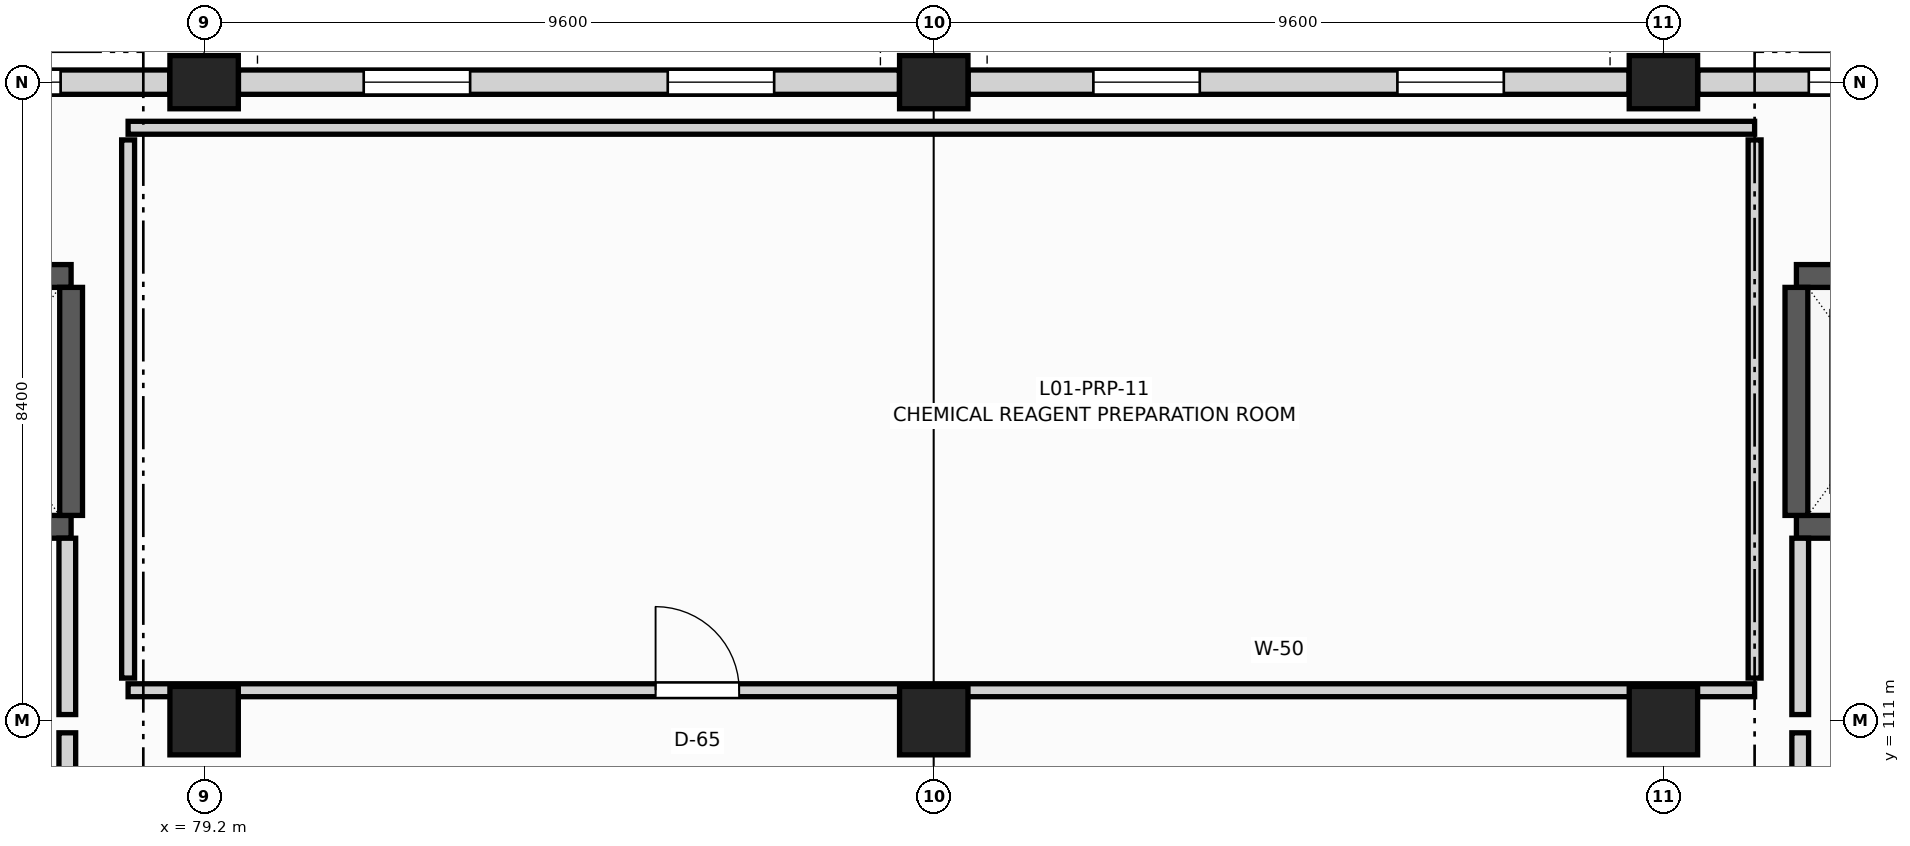
"""IFC4 building model, lengths in metres.
Left out: names, types, materials, properties, quantities, classifications, styles, units other than length and angle.
Written with IfcOpenShell. Run it as: python <this file> out.ifc"""

import sys

from ifc_helpers import new_model, si_unit, direction, frame, frame_2d, origin, origin_2d, place, context, subcontext, project, spatial, rectangle, extrude, element, fill, save


model = new_model("IFC4")
c1 = context("Model", 3, precision=1e-05, world=origin(), true_north=direction((0.0, 1.0)))
c2 = subcontext(c1, "Body", "Model", "MODEL_VIEW")
j1 = project(units=[si_unit("LENGTHUNIT", "METRE"), si_unit("PLANEANGLEUNIT", "RADIAN")], contexts=[c1])
p1 = place(None, origin())
s1 = spatial("IfcSite", under=j1, at=p1, CompositionType="ELEMENT")
p2 = place(p1, origin())
s2 = spatial("IfcBuilding", under=s1, at=p2, CompositionType="ELEMENT")
p3 = place(p2, frame((0.0, 0.0, 5.4)))
s3 = spatial("IfcBuildingStorey", under=s2, at=p3, CompositionType="ELEMENT", Elevation=5.4)
p4 = place(p3, frame((79.2, 111.0, 0.0), z_axis=(0.0, 0.0, 1.0), x_axis=(1.0, 0.0, 0.0)))
e1 = element("IfcColumn", 1, at=p4, inside=s3, PredefinedType="COLUMN", context=c2, shape_type="SweptSolid", body=[
    extrude(rectangle(XDim=0.9, YDim=0.9, at=origin_2d()), origin(), (0.0, 0.0, 1.0), 4.18),
])
p5 = place(p3, frame((79.2, 119.4, 0.0), z_axis=(0.0, 0.0, 1.0), x_axis=(1.0, 0.0, 0.0)))
e2 = element("IfcColumn", 2, at=p5, inside=s3, PredefinedType="COLUMN", context=c2, shape_type="SweptSolid", body=[
    extrude(rectangle(XDim=0.9, YDim=0.7, at=origin_2d()), origin(), (0.0, 0.0, 1.0), 4.18),
])
p6 = place(p3, frame((88.8, 111.0, 0.0), z_axis=(0.0, 0.0, 1.0), x_axis=(1.0, 0.0, 0.0)))
e3 = element("IfcColumn", 3, at=p6, inside=s3, PredefinedType="COLUMN", context=c2, shape_type="SweptSolid", body=[
    extrude(rectangle(XDim=0.9, YDim=0.9, at=origin_2d()), origin(), (0.0, 0.0, 1.0), 4.18),
])
p7 = place(p3, frame((88.8, 119.4, 0.0), z_axis=(0.0, 0.0, 1.0), x_axis=(1.0, 0.0, 0.0)))
e4 = element("IfcColumn", 4, at=p7, inside=s3, PredefinedType="COLUMN", context=c2, shape_type="SweptSolid", body=[
    extrude(rectangle(XDim=0.9, YDim=0.7, at=origin_2d()), origin(), (0.0, 0.0, 1.0), 4.18),
])
p8 = place(p3, frame((98.4, 111.0, 0.0), z_axis=(0.0, 0.0, 1.0), x_axis=(1.0, 0.0, 0.0)))
e5 = element("IfcColumn", 5, at=p8, inside=s3, PredefinedType="COLUMN", context=c2, shape_type="SweptSolid", body=[
    extrude(rectangle(XDim=0.9, YDim=0.9, at=origin_2d()), origin(), (0.0, 0.0, 1.0), 4.18),
])
p9 = place(p3, frame((98.4, 119.4, 0.0), z_axis=(0.0, 0.0, 1.0), x_axis=(1.0, 0.0, 0.0)))
e6 = element("IfcColumn", 6, at=p9, inside=s3, PredefinedType="COLUMN", context=c2, shape_type="SweptSolid", body=[
    extrude(rectangle(XDim=0.9, YDim=0.7, at=origin_2d()), origin(), (0.0, 0.0, 1.0), 4.18),
])
p10 = place(p3, frame((74.476, 119.4, 0.0), z_axis=(0.0, 0.0, 1.0), x_axis=(1.0, 0.0, 0.0)))
e7 = element("IfcWall", 7, at=p10, inside=s3, PredefinedType="SOLIDWALL", context=c2, shape_type="SweptSolid", body=[
    extrude(rectangle(XDim=4.272, YDim=0.32, at=frame_2d((2.136, 0.0))), origin(), (0.0, 0.0, 1.0), 3.38),
])
p11 = place(p10, frame((1.436, 0.0, 0.9)))
e8 = element("IfcOpeningElement", 8, at=p11, cuts=e7, PredefinedType="OPENING", context=c2, shape_type="SweptSolid", body=[
    extrude(rectangle(XDim=1.4, YDim=1.65, at=frame_2d((0.7, 0.825))), frame((0.0, 0.17, 0.0), z_axis=(0.0, -1.0, 0.0), x_axis=(1.0, 0.0, 0.0)), (0.0, 0.0, 1.0), 0.34),
])
p12 = place(p3, frame((79.652, 119.4, 0.0), z_axis=(0.0, 0.0, 1.0), x_axis=(1.0, 0.0, 0.0)))
e9 = element("IfcWall", 9, at=p12, inside=s3, PredefinedType="SOLIDWALL", context=c2, shape_type="SweptSolid", body=[
    extrude(rectangle(XDim=8.696, YDim=0.32, at=frame_2d((4.348, 0.0))), origin(), (0.0, 0.0, 1.0), 3.38),
])
p13 = place(p12, frame((1.648, 0.0, 0.85)))
e10 = element("IfcOpeningElement", 10, at=p13, cuts=e9, PredefinedType="OPENING", context=c2, shape_type="SweptSolid", body=[
    extrude(rectangle(XDim=1.4, YDim=1.65, at=frame_2d((0.7, 0.825))), frame((0.0, 0.17, 0.0), z_axis=(0.0, -1.0, 0.0), x_axis=(1.0, 0.0, 0.0)), (0.0, 0.0, 1.0), 0.34),
])
p14 = place(p12, frame((5.648, 0.0, 0.85)))
e11 = element("IfcOpeningElement", 11, at=p14, cuts=e9, PredefinedType="OPENING", context=c2, shape_type="SweptSolid", body=[
    extrude(rectangle(XDim=1.4, YDim=1.65, at=frame_2d((0.7, 0.825))), frame((0.0, 0.17, 0.0), z_axis=(0.0, -1.0, 0.0), x_axis=(1.0, 0.0, 0.0)), (0.0, 0.0, 1.0), 0.34),
])
p15 = place(p3, frame((89.252, 119.4, 0.0), z_axis=(0.0, 0.0, 1.0), x_axis=(1.0, 0.0, 0.0)))
e12 = element("IfcWall", 12, at=p15, inside=s3, PredefinedType="SOLIDWALL", context=c2, shape_type="SweptSolid", body=[
    extrude(rectangle(XDim=8.696, YDim=0.32, at=frame_2d((4.348, 0.0))), origin(), (0.0, 0.0, 1.0), 3.38),
])
p16 = place(p15, frame((1.648, 0.0, 0.85)))
e13 = element("IfcOpeningElement", 13, at=p16, cuts=e12, PredefinedType="OPENING", context=c2, shape_type="SweptSolid", body=[
    extrude(rectangle(XDim=1.4, YDim=1.65, at=frame_2d((0.7, 0.825))), frame((0.0, 0.17, 0.0), z_axis=(0.0, -1.0, 0.0), x_axis=(1.0, 0.0, 0.0)), (0.0, 0.0, 1.0), 0.34),
])
p17 = place(p15, frame((5.648, 0.0, 0.85)))
e14 = element("IfcOpeningElement", 14, at=p17, cuts=e12, PredefinedType="OPENING", context=c2, shape_type="SweptSolid", body=[
    extrude(rectangle(XDim=1.4, YDim=1.65, at=frame_2d((0.7, 0.825))), frame((0.0, 0.17, 0.0), z_axis=(0.0, -1.0, 0.0), x_axis=(1.0, 0.0, 0.0)), (0.0, 0.0, 1.0), 0.34),
])
p18 = place(p3, frame((98.852, 119.4, 0.0), z_axis=(0.0, 0.0, 1.0), x_axis=(1.0, 0.0, 0.0)))
e15 = element("IfcWall", 15, at=p18, inside=s3, PredefinedType="SOLIDWALL", context=c2, shape_type="SweptSolid", body=[
    extrude(rectangle(XDim=4.322, YDim=0.32, at=frame_2d((2.161, 0.0))), origin(), (0.0, 0.0, 1.0), 3.38),
])
p19 = place(p18, frame((1.461, 0.0, 0.9)))
e16 = element("IfcOpeningElement", 16, at=p19, cuts=e15, PredefinedType="OPENING", context=c2, shape_type="SweptSolid", body=[
    extrude(rectangle(XDim=1.4, YDim=1.65, at=frame_2d((0.7, 0.825))), frame((0.0, 0.17, 0.0), z_axis=(0.0, -1.0, 0.0), x_axis=(1.0, 0.0, 0.0)), (0.0, 0.0, 1.0), 0.34),
])
p20 = place(p3, frame((74.7, 113.55, 0.0), z_axis=(0.0, 0.0, 1.0), x_axis=(1.0, 0.0, 0.0)))
e17 = element("IfcWall", 17, at=p20, inside=s3, PredefinedType="SHEAR", context=c2, shape_type="SweptSolid", body=[
    extrude(rectangle(XDim=2.75, YDim=0.3, at=frame_2d((1.375, 0.0))), origin(), (0.0, 0.0, 1.0), 4.18),
])
p21 = place(p20, frame((0.775, 0.0, 0.0)))
e18 = element("IfcOpeningElement", 18, at=p21, cuts=e17, PredefinedType="OPENING", context=c2, shape_type="SweptSolid", body=[
    extrude(rectangle(XDim=1.2, YDim=2.2, at=frame_2d((0.6, 1.1))), frame((0.0, 0.16, 0.0), z_axis=(0.0, -1.0, 0.0), x_axis=(1.0, 0.0, 0.0)), (0.0, 0.0, 1.0), 0.32),
])
p22 = place(p3, frame((74.7, 116.85, 0.0), z_axis=(0.0, 0.0, 1.0), x_axis=(1.0, 0.0, 0.0)))
e19 = element("IfcWall", 19, at=p22, inside=s3, PredefinedType="SHEAR", context=c2, shape_type="SweptSolid", body=[
    extrude(rectangle(XDim=2.75, YDim=0.3, at=frame_2d((1.375, 0.0))), origin(), (0.0, 0.0, 1.0), 4.18),
])
p23 = place(p3, frame((77.45, 113.7, 0.0), z_axis=(0.0, 0.0, 1.0), x_axis=(0.0, 1.0, 0.0)))
e20 = element("IfcWall", 20, at=p23, inside=s3, PredefinedType="SHEAR", context=c2, shape_type="SweptSolid", body=[
    extrude(rectangle(XDim=3.0, YDim=0.3, at=frame_2d((1.5, 0.0))), origin(), (0.0, 0.0, 1.0), 4.18),
])
p24 = place(p3, frame((100.15, 113.55, 0.0), z_axis=(0.0, 0.0, 1.0), x_axis=(1.0, 0.0, 0.0)))
e21 = element("IfcWall", 21, at=p24, inside=s3, PredefinedType="SHEAR", context=c2, shape_type="SweptSolid", body=[
    extrude(rectangle(XDim=2.825, YDim=0.3, at=frame_2d((1.413, 0.0))), origin(), (0.0, 0.0, 1.0), 4.18),
])
p25 = place(p24, frame((0.812, 0.0, 0.0)))
e22 = element("IfcOpeningElement", 22, at=p25, cuts=e21, PredefinedType="OPENING", context=c2, shape_type="SweptSolid", body=[
    extrude(rectangle(XDim=1.2, YDim=2.2, at=frame_2d((0.6, 1.1))), frame((0.0, 0.16, 0.0), z_axis=(0.0, -1.0, 0.0), x_axis=(1.0, 0.0, 0.0)), (0.0, 0.0, 1.0), 0.32),
])
p26 = place(p3, frame((100.15, 116.85, 0.0), z_axis=(0.0, 0.0, 1.0), x_axis=(1.0, 0.0, 0.0)))
e23 = element("IfcWall", 23, at=p26, inside=s3, PredefinedType="SHEAR", context=c2, shape_type="SweptSolid", body=[
    extrude(rectangle(XDim=2.825, YDim=0.3, at=frame_2d((1.413, 0.0))), origin(), (0.0, 0.0, 1.0), 4.18),
])
p27 = place(p3, frame((100.15, 113.7, 0.0), z_axis=(0.0, 0.0, 1.0), x_axis=(0.0, 1.0, 0.0)))
e24 = element("IfcWall", 24, at=p27, inside=s3, PredefinedType="SHEAR", context=c2, shape_type="SweptSolid", body=[
    extrude(rectangle(XDim=3.0, YDim=0.3, at=frame_2d((1.5, 0.0))), origin(), (0.0, 0.0, 1.0), 4.18),
])
p28 = place(p3, frame((77.4, 111.08, 0.0), z_axis=(0.0, 0.0, 1.0), x_axis=(0.0, 1.0, 0.0)))
e25 = element("IfcWall", 25, at=p28, inside=s3, PredefinedType="PARTITIONING", context=c2, shape_type="SweptSolid", body=[
    extrude(rectangle(XDim=2.32, YDim=0.22, at=frame_2d((1.16, 0.0))), origin(), (0.0, 0.0, 1.0), 3.22),
])
p29 = place(p3, frame((77.4, 107.76, 0.0), z_axis=(0.0, 0.0, 1.0), x_axis=(0.0, 1.0, 0.0)))
e26 = element("IfcWall", 26, at=p29, inside=s3, PredefinedType="PARTITIONING", context=c2, shape_type="SweptSolid", body=[
    extrude(rectangle(XDim=3.08, YDim=0.22, at=frame_2d((1.54, 0.0))), origin(), (0.0, 0.0, 1.0), 3.22),
])
p30 = place(p3, frame((100.2, 111.08, 0.0), z_axis=(0.0, 0.0, 1.0), x_axis=(0.0, 1.0, 0.0)))
e27 = element("IfcWall", 27, at=p30, inside=s3, PredefinedType="PARTITIONING", context=c2, shape_type="SweptSolid", body=[
    extrude(rectangle(XDim=2.32, YDim=0.22, at=frame_2d((1.16, 0.0))), origin(), (0.0, 0.0, 1.0), 3.22),
])
p31 = place(p3, frame((100.2, 107.76, 0.0), z_axis=(0.0, 0.0, 1.0), x_axis=(0.0, 1.0, 0.0)))
e28 = element("IfcWall", 28, at=p31, inside=s3, PredefinedType="PARTITIONING", context=c2, shape_type="SweptSolid", body=[
    extrude(rectangle(XDim=3.08, YDim=0.22, at=frame_2d((1.54, 0.0))), origin(), (0.0, 0.0, 1.0), 3.22),
])
p32 = place(p3, frame((78.2, 111.4, 0.0), z_axis=(0.0, 0.0, 1.0), x_axis=(1.0, 0.0, 0.0)))
e29 = element("IfcWall", 29, at=p32, inside=s3, PredefinedType="PARTITIONING", context=c2, shape_type="SweptSolid", body=[
    extrude(rectangle(XDim=21.4, YDim=0.17, at=frame_2d((10.7, 0.0))), origin(), (0.0, 0.0, 1.0), 3.22),
])
p33 = place(p32, frame((6.94, 0.0, 0.0)))
e30 = element("IfcOpeningElement", 30, at=p33, cuts=e29, PredefinedType="OPENING", context=c2, shape_type="SweptSolid", body=[
    extrude(rectangle(XDim=1.1, YDim=2.2, at=frame_2d((0.55, 1.1))), frame((0.0, 0.095, 0.0), z_axis=(0.0, -1.0, 0.0), x_axis=(1.0, 0.0, 0.0)), (0.0, 0.0, 1.0), 0.19),
])
p34 = place(p3, frame((78.2, 118.8, 0.0), z_axis=(0.0, 0.0, 1.0), x_axis=(1.0, 0.0, 0.0)))
e31 = element("IfcWall", 31, at=p34, inside=s3, PredefinedType="PARTITIONING", context=c2, shape_type="SweptSolid", body=[
    extrude(rectangle(XDim=21.4, YDim=0.17, at=frame_2d((10.7, 0.0))), origin(), (0.0, 0.0, 1.0), 3.22),
])
for number, where, z_axis, x_axis in (
    (32, (78.2, 111.56, 0.0), (0.0, 0.0, 1.0), (0.0, 1.0, 0.0)),
    (33, (99.6, 111.56, 0.0), (0.0, 0.0, 1.0), (0.0, 1.0, 0.0)),
):
    element("IfcWall", number, at=place(p3, frame(where, z_axis=z_axis, x_axis=x_axis)), inside=s3, PredefinedType="PARTITIONING", context=c2, shape_type="SweptSolid", body=[
        extrude(rectangle(XDim=7.08, YDim=0.17, at=frame_2d((3.54, 0.0))), origin(), (0.0, 0.0, 1.0), 3.22),
    ])
p35 = place(p11, origin())
e34 = element("IfcWindow", 34, at=p35, inside=s3, PartitioningType="SINGLE_PANEL", PredefinedType="WINDOW", context=c2, shape_type="SweptSolid", body=[
    extrude(rectangle(XDim=1.4, YDim=1.65, at=frame_2d((0.7, 0.825))), frame((0.0, 0.03, 0.0), z_axis=(0.0, -1.0, 0.0), x_axis=(1.0, 0.0, 0.0)), (0.0, 0.0, 1.0), 0.06),
])
fill(e8, e34)
p36 = place(p13, origin())
e35 = element("IfcWindow", 35, at=p36, inside=s3, PartitioningType="SINGLE_PANEL", PredefinedType="WINDOW", context=c2, shape_type="SweptSolid", body=[
    extrude(rectangle(XDim=1.4, YDim=1.65, at=frame_2d((0.7, 0.825))), frame((0.0, 0.03, 0.0), z_axis=(0.0, -1.0, 0.0), x_axis=(1.0, 0.0, 0.0)), (0.0, 0.0, 1.0), 0.06),
])
fill(e10, e35)
p37 = place(p14, origin())
e36 = element("IfcWindow", 36, at=p37, inside=s3, PartitioningType="SINGLE_PANEL", PredefinedType="WINDOW", context=c2, shape_type="SweptSolid", body=[
    extrude(rectangle(XDim=1.4, YDim=1.65, at=frame_2d((0.7, 0.825))), frame((0.0, 0.03, 0.0), z_axis=(0.0, -1.0, 0.0), x_axis=(1.0, 0.0, 0.0)), (0.0, 0.0, 1.0), 0.06),
])
fill(e11, e36)
p38 = place(p16, origin())
e37 = element("IfcWindow", 37, at=p38, inside=s3, PartitioningType="SINGLE_PANEL", PredefinedType="WINDOW", context=c2, shape_type="SweptSolid", body=[
    extrude(rectangle(XDim=1.4, YDim=1.65, at=frame_2d((0.7, 0.825))), frame((0.0, 0.03, 0.0), z_axis=(0.0, -1.0, 0.0), x_axis=(1.0, 0.0, 0.0)), (0.0, 0.0, 1.0), 0.06),
])
fill(e13, e37)
p39 = place(p17, origin())
e38 = element("IfcWindow", 38, at=p39, inside=s3, PartitioningType="SINGLE_PANEL", PredefinedType="WINDOW", context=c2, shape_type="SweptSolid", body=[
    extrude(rectangle(XDim=1.4, YDim=1.65, at=frame_2d((0.7, 0.825))), frame((0.0, 0.03, 0.0), z_axis=(0.0, -1.0, 0.0), x_axis=(1.0, 0.0, 0.0)), (0.0, 0.0, 1.0), 0.06),
])
fill(e14, e38)
p40 = place(p19, origin())
e39 = element("IfcWindow", 39, at=p40, inside=s3, PartitioningType="SINGLE_PANEL", PredefinedType="WINDOW", context=c2, shape_type="SweptSolid", body=[
    extrude(rectangle(XDim=1.4, YDim=1.65, at=frame_2d((0.7, 0.825))), frame((0.0, 0.03, 0.0), z_axis=(0.0, -1.0, 0.0), x_axis=(1.0, 0.0, 0.0)), (0.0, 0.0, 1.0), 0.06),
])
fill(e16, e39)
p41 = place(p33, origin())
e40 = element("IfcDoor", 40, at=p41, inside=s3, OperationType="SINGLE_SWING_LEFT", PredefinedType="DOOR", context=c2, shape_type="SweptSolid", body=[
    extrude(rectangle(XDim=1.1, YDim=2.2, at=frame_2d((0.55, 1.1))), frame((0.0, 0.025, 0.0), z_axis=(0.0, -1.0, 0.0), x_axis=(1.0, 0.0, 0.0)), (0.0, 0.0, 1.0), 0.05),
])
fill(e30, e40)
save(model, sys.argv[1])
